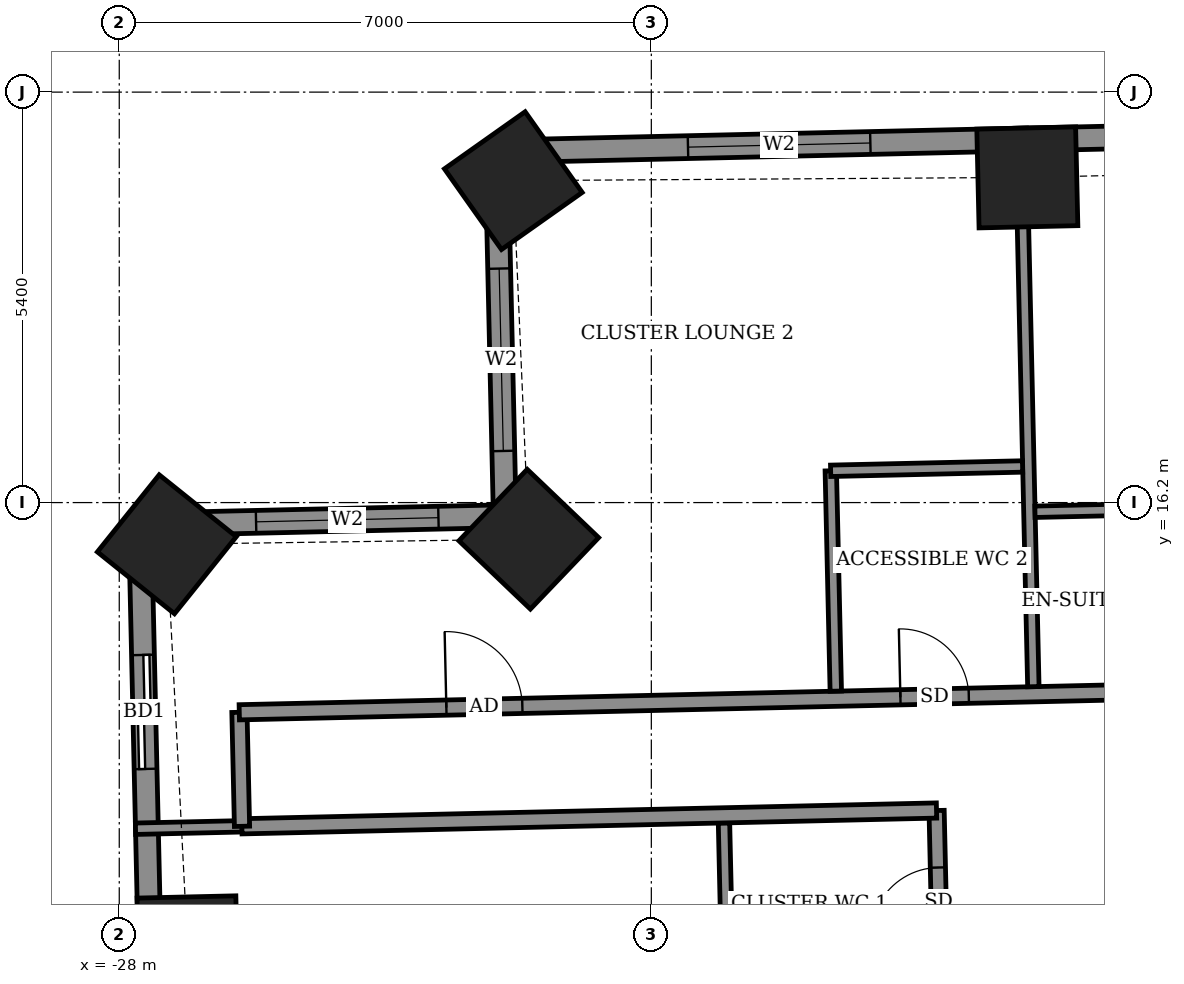
"""IFC4 building model, lengths in metres.
Left out: names, types, materials, properties, quantities, classifications, styles, units other than length and angle.
Written with IfcOpenShell. Run it as: python <this file> out.ifc"""

import sys

from ifc_helpers import new_model, si_unit, direction, frame, frame_2d, origin, origin_2d, place, context, subcontext, project, spatial, rectangle, extrude, element, fill, save


model = new_model("IFC4")
c1 = context("Model", 3, precision=1e-05, world=origin(), true_north=direction((0.0, 1.0)))
c2 = subcontext(c1, "Body", "Model", "MODEL_VIEW")
j1 = project(units=[si_unit("LENGTHUNIT", "METRE"), si_unit("PLANEANGLEUNIT", "RADIAN")], contexts=[c1])
p1 = place(None, origin())
s1 = spatial("IfcSite", under=j1, at=p1, CompositionType="ELEMENT")
p2 = place(p1, origin())
s2 = spatial("IfcBuilding", under=s1, at=p2, CompositionType="ELEMENT")
p3 = place(p2, frame((0.0, 0.0, 137.3)))
s3 = spatial("IfcBuildingStorey", under=s2, at=p3, CompositionType="ELEMENT", Elevation=137.3)
for number, where, z_axis, x_axis in (
    (1, (-16.053, 20.478, -0.55), (0.0, 0.0, 1.0), (-1.0, -0.023, 0.0)),
    (2, (-22.816, 20.435, -0.55), (0.0, 0.0, 1.0), (-0.816, -0.577, 0.0)),
    (3, (-22.612, 15.718, -0.55), (0.0, 0.0, 1.0), (-0.691, -0.723, 0.0)),
    (4, (-27.374, 15.651, -0.55), (0.0, 0.0, 1.0), (-0.626, -0.78, 0.0)),
    (5, (-27.101, 10.362, -0.55), (0.0, 0.0, 1.0), (0.023, -1.0, 0.0)),
):
    element("IfcColumn", number, at=place(p3, frame(where, z_axis=z_axis, x_axis=x_axis)), inside=s3, PredefinedType="COLUMN", context=c2, shape_type="SweptSolid", body=[
        extrude(rectangle(XDim=1.3, YDim=1.3, at=origin_2d()), origin(), (0.0, 0.0, 1.0), 3.6),
    ])
p4 = place(p3, frame((19.396, 21.782, 0.0), z_axis=(0.0, 0.0, 1.0), x_axis=(-0.999742636707, -0.022686126826, 0.0)))
e6 = element("IfcWall", 6, at=p4, inside=s3, PredefinedType="SOLIDWALL", context=c2, shape_type="SweptSolid", body=[
    extrude(rectangle(XDim=42.444, YDim=0.3, at=frame_2d((21.222, 0.0))), origin(), (0.0, 0.0, 1.0), 3.05),
])
p5 = place(p4, frame((1.982, 0.0, 0.0)))
e7 = element("IfcOpeningElement", 7, at=p5, cuts=e6, PredefinedType="OPENING", context=c2, shape_type="SweptSolid", body=[
    extrude(rectangle(XDim=1.5, YDim=2.4, at=frame_2d((0.75, 1.2))), frame((0.0, 0.16, 0.0), z_axis=(0.0, -1.0, 0.0), x_axis=(1.0, 0.0, 0.0)), (0.0, 0.0, 1.0), 0.32),
])
p6 = place(p4, frame((5.009, 0.0, 0.0)))
e8 = element("IfcOpeningElement", 8, at=p6, cuts=e6, PredefinedType="OPENING", context=c2, shape_type="SweptSolid", body=[
    extrude(rectangle(XDim=1.2, YDim=2.4, at=frame_2d((0.6, 1.2))), frame((0.0, 0.16, 0.0), z_axis=(0.0, -1.0, 0.0), x_axis=(1.0, 0.0, 0.0)), (0.0, 0.0, 1.0), 0.32),
])
p7 = place(p4, frame((10.394, 0.0, 0.0)))
e9 = element("IfcOpeningElement", 9, at=p7, cuts=e6, PredefinedType="OPENING", context=c2, shape_type="SweptSolid", body=[
    extrude(rectangle(XDim=1.5, YDim=2.4, at=frame_2d((0.75, 1.2))), frame((0.0, 0.16, 0.0), z_axis=(0.0, -1.0, 0.0), x_axis=(1.0, 0.0, 0.0)), (0.0, 0.0, 1.0), 0.32),
])
p8 = place(p4, frame((15.346, 0.0, 0.0)))
e10 = element("IfcOpeningElement", 10, at=p8, cuts=e6, PredefinedType="OPENING", context=c2, shape_type="SweptSolid", body=[
    extrude(rectangle(XDim=1.5, YDim=2.4, at=frame_2d((0.75, 1.2))), frame((0.0, 0.16, 0.0), z_axis=(0.0, -1.0, 0.0), x_axis=(1.0, 0.0, 0.0)), (0.0, 0.0, 1.0), 0.32),
])
p9 = place(p4, frame((18.508, 0.0, 0.0)))
e11 = element("IfcOpeningElement", 11, at=p9, cuts=e6, PredefinedType="OPENING", context=c2, shape_type="SweptSolid", body=[
    extrude(rectangle(XDim=1.5, YDim=2.4, at=frame_2d((0.75, 1.2))), frame((0.0, 0.16, 0.0), z_axis=(0.0, -1.0, 0.0), x_axis=(1.0, 0.0, 0.0)), (0.0, 0.0, 1.0), 0.32),
])
p10 = place(p4, frame((23.544, 0.0, 0.0)))
e12 = element("IfcOpeningElement", 12, at=p10, cuts=e6, PredefinedType="OPENING", context=c2, shape_type="SweptSolid", body=[
    extrude(rectangle(XDim=1.5, YDim=2.4, at=frame_2d((0.75, 1.2))), frame((0.0, 0.16, 0.0), z_axis=(0.0, -1.0, 0.0), x_axis=(1.0, 0.0, 0.0)), (0.0, 0.0, 1.0), 0.32),
])
p11 = place(p4, frame((29.195, 0.0, 0.0)))
e13 = element("IfcOpeningElement", 13, at=p11, cuts=e6, PredefinedType="OPENING", context=c2, shape_type="SweptSolid", body=[
    extrude(rectangle(XDim=1.5, YDim=2.4, at=frame_2d((0.75, 1.2))), frame((0.0, 0.16, 0.0), z_axis=(0.0, -1.0, 0.0), x_axis=(1.0, 0.0, 0.0)), (0.0, 0.0, 1.0), 0.32),
])
p12 = place(p4, frame((32.357, 0.0, 0.0)))
e14 = element("IfcOpeningElement", 14, at=p12, cuts=e6, PredefinedType="OPENING", context=c2, shape_type="SweptSolid", body=[
    extrude(rectangle(XDim=1.5, YDim=2.4, at=frame_2d((0.75, 1.2))), frame((0.0, 0.16, 0.0), z_axis=(0.0, -1.0, 0.0), x_axis=(1.0, 0.0, 0.0)), (0.0, 0.0, 1.0), 0.32),
])
p13 = place(p4, frame((37.524, 0.0, 0.9)))
e15 = element("IfcOpeningElement", 15, at=p13, cuts=e6, PredefinedType="OPENING", context=c2, shape_type="SweptSolid", body=[
    extrude(rectangle(XDim=2.4, YDim=1.5, at=frame_2d((1.2, 0.75))), frame((0.0, 0.16, 0.0), z_axis=(0.0, -1.0, 0.0), x_axis=(1.0, 0.0, 0.0)), (0.0, 0.0, 1.0), 0.32),
])
p14 = place(p3, frame((-23.037, 20.819, 0.0), z_axis=(0.0, 0.0, 1.0), x_axis=(0.022738738327, -0.999741441463, 0.0)))
e16 = element("IfcWall", 16, at=p14, inside=s3, PredefinedType="SOLIDWALL", context=c2, shape_type="SweptSolid", body=[
    extrude(rectangle(XDim=4.799, YDim=0.3, at=frame_2d((2.4, 0.0))), origin(), (0.0, 0.0, 1.0), 2.55),
])
p15 = place(p14, frame((1.541, 0.0, 0.9)))
e17 = element("IfcOpeningElement", 17, at=p15, cuts=e16, PredefinedType="OPENING", context=c2, shape_type="SweptSolid", body=[
    extrude(rectangle(XDim=2.4, YDim=1.5, at=frame_2d((1.2, 0.75))), frame((0.0, 0.16, 0.0), z_axis=(0.0, -1.0, 0.0), x_axis=(1.0, 0.0, 0.0)), (0.0, 0.0, 1.0), 0.32),
])
p16 = place(p3, frame((-22.928, 16.021, 0.0), z_axis=(0.0, 0.0, 1.0), x_axis=(-0.999742701292, -0.022683280499, 0.0)))
e18 = element("IfcWall", 18, at=p16, inside=s3, PredefinedType="SOLIDWALL", context=c2, shape_type="SweptSolid", body=[
    extrude(rectangle(XDim=4.8, YDim=0.3, at=frame_2d((2.4, 0.0))), origin(), (0.0, 0.0, 1.0), 2.55),
])
p17 = place(p16, frame((0.873, 0.0, 0.9)))
e19 = element("IfcOpeningElement", 19, at=p17, cuts=e18, PredefinedType="OPENING", context=c2, shape_type="SweptSolid", body=[
    extrude(rectangle(XDim=2.4, YDim=1.5, at=frame_2d((1.2, 0.75))), frame((0.0, 0.16, 0.0), z_axis=(0.0, -1.0, 0.0), x_axis=(1.0, 0.0, 0.0)), (0.0, 0.0, 1.0), 0.32),
])
p18 = place(p3, frame((-27.727, 15.912, 0.0), z_axis=(0.0, 0.0, 1.0), x_axis=(0.022690078929, -0.999742547018, 0.0)))
e20 = element("IfcWall", 20, at=p18, inside=s3, PredefinedType="SOLIDWALL", context=c2, shape_type="SweptSolid", body=[
    extrude(rectangle(XDim=11.33, YDim=0.3, at=frame_2d((5.665, 0.0))), origin(), (0.0, 0.0, 1.0), 3.05),
])
p19 = place(p18, frame((1.717, 0.0, 0.0)))
e21 = element("IfcOpeningElement", 21, at=p19, cuts=e20, PredefinedType="OPENING", context=c2, shape_type="SweptSolid", body=[
    extrude(rectangle(XDim=1.5, YDim=2.4, at=frame_2d((0.75, 1.2))), frame((0.0, 0.16, 0.0), z_axis=(0.0, -1.0, 0.0), x_axis=(1.0, 0.0, 0.0)), (0.0, 0.0, 1.0), 0.32),
])
p20 = place(p18, frame((6.544, 0.0, 0.9)))
e22 = element("IfcOpeningElement", 22, at=p20, cuts=e20, PredefinedType="OPENING", context=c2, shape_type="SweptSolid", body=[
    extrude(rectangle(XDim=1.2, YDim=1.5, at=frame_2d((0.6, 0.75))), frame((0.0, 0.16, 0.0), z_axis=(0.0, -1.0, 0.0), x_axis=(1.0, 0.0, 0.0)), (0.0, 0.0, 1.0), 0.32),
])
p21 = place(p18, frame((8.95, 0.0, 0.9)))
e23 = element("IfcOpeningElement", 23, at=p21, cuts=e20, PredefinedType="OPENING", context=c2, shape_type="SweptSolid", body=[
    extrude(rectangle(XDim=1.2, YDim=1.5, at=frame_2d((0.6, 0.75))), frame((0.0, 0.16, 0.0), z_axis=(0.0, -1.0, 0.0), x_axis=(1.0, 0.0, 0.0)), (0.0, 0.0, 1.0), 0.32),
])
p22 = place(p3, frame((-16.603, -16.218, 0.0), z_axis=(0.0, 0.0, 1.0), x_axis=(-0.022698146637, 0.999742363881, 0.0)))
e24 = element("IfcWall", 24, at=p22, inside=s3, PredefinedType="PARTITIONING", context=c2, shape_type="SweptSolid", body=[
    extrude(rectangle(XDim=28.374, YDim=0.2, at=frame_2d((14.187, 0.0))), origin(), (0.0, 0.0, 1.0), 3.05),
])
p23 = place(p22, frame((24.537, 0.0, 0.0)))
e25 = element("IfcOpeningElement", 25, at=p23, cuts=e24, PredefinedType="OPENING", context=c2, shape_type="SweptSolid", body=[
    extrude(rectangle(XDim=1.0, YDim=2.1, at=frame_2d((0.5, 1.05))), frame((0.0, 0.11, 0.0), z_axis=(0.0, -1.0, 0.0), x_axis=(1.0, 0.0, 0.0)), (0.0, 0.0, 1.0), 0.22),
])
p24 = place(p22, frame((26.724, 0.0, 0.0)))
e26 = element("IfcOpeningElement", 26, at=p24, cuts=e24, PredefinedType="OPENING", context=c2, shape_type="SweptSolid", body=[
    extrude(rectangle(XDim=0.9, YDim=2.1, at=frame_2d((0.45, 1.05))), frame((0.0, 0.11, 0.0), z_axis=(0.0, -1.0, 0.0), x_axis=(1.0, 0.0, 0.0)), (0.0, 0.0, 1.0), 0.22),
])
p25 = place(p22, frame((22.099, 0.0, 0.0)))
e27 = element("IfcOpeningElement", 27, at=p25, cuts=e24, PredefinedType="OPENING", context=c2, shape_type="SweptSolid", body=[
    extrude(rectangle(XDim=1.0, YDim=2.1, at=frame_2d((0.5, 1.05))), frame((0.0, 0.11, 0.0), z_axis=(0.0, -1.0, 0.0), x_axis=(1.0, 0.0, 0.0)), (0.0, 0.0, 1.0), 0.22),
])
p26 = place(p22, frame((16.324, 0.0, 0.0)))
e28 = element("IfcOpeningElement", 28, at=p26, cuts=e24, PredefinedType="OPENING", context=c2, shape_type="SweptSolid", body=[
    extrude(rectangle(XDim=1.0, YDim=2.1, at=frame_2d((0.5, 1.05))), frame((0.0, 0.11, 0.0), z_axis=(0.0, -1.0, 0.0), x_axis=(1.0, 0.0, 0.0)), (0.0, 0.0, 1.0), 0.22),
])
p27 = place(p22, frame((19.449, 0.0, 0.0)))
e29 = element("IfcOpeningElement", 29, at=p27, cuts=e24, PredefinedType="OPENING", context=c2, shape_type="SweptSolid", body=[
    extrude(rectangle(XDim=0.9, YDim=2.1, at=frame_2d((0.45, 1.05))), frame((0.0, 0.11, 0.0), z_axis=(0.0, -1.0, 0.0), x_axis=(1.0, 0.0, 0.0)), (0.0, 0.0, 1.0), 0.22),
])
p28 = place(p22, frame((13.574, 0.0, 0.0)))
e30 = element("IfcOpeningElement", 30, at=p28, cuts=e24, PredefinedType="OPENING", context=c2, shape_type="SweptSolid", body=[
    extrude(rectangle(XDim=1.0, YDim=2.1, at=frame_2d((0.5, 1.05))), frame((0.0, 0.11, 0.0), z_axis=(0.0, -1.0, 0.0), x_axis=(1.0, 0.0, 0.0)), (0.0, 0.0, 1.0), 0.22),
])
p29 = place(p22, frame((11.449, 0.0, 0.0)))
e31 = element("IfcOpeningElement", 31, at=p29, cuts=e24, PredefinedType="OPENING", context=c2, shape_type="SweptSolid", body=[
    extrude(rectangle(XDim=0.9, YDim=2.1, at=frame_2d((0.45, 1.05))), frame((0.0, 0.11, 0.0), z_axis=(0.0, -1.0, 0.0), x_axis=(1.0, 0.0, 0.0)), (0.0, 0.0, 1.0), 0.22),
])
p30 = place(p22, frame((8.524, 0.0, 0.0)))
e32 = element("IfcOpeningElement", 32, at=p30, cuts=e24, PredefinedType="OPENING", context=c2, shape_type="SweptSolid", body=[
    extrude(rectangle(XDim=1.0, YDim=2.1, at=frame_2d((0.5, 1.05))), frame((0.0, 0.11, 0.0), z_axis=(0.0, -1.0, 0.0), x_axis=(1.0, 0.0, 0.0)), (0.0, 0.0, 1.0), 0.22),
])
p31 = place(p22, frame((5.325, 0.0, 0.0)))
e33 = element("IfcOpeningElement", 33, at=p31, cuts=e24, PredefinedType="OPENING", context=c2, shape_type="SweptSolid", body=[
    extrude(rectangle(XDim=1.0, YDim=2.1, at=frame_2d((0.5, 1.05))), frame((0.0, 0.11, 0.0), z_axis=(0.0, -1.0, 0.0), x_axis=(1.0, 0.0, 0.0)), (0.0, 0.0, 1.0), 0.22),
])
p32 = place(p22, frame((2.85, 0.0, 0.0)))
e34 = element("IfcOpeningElement", 34, at=p32, cuts=e24, PredefinedType="OPENING", context=c2, shape_type="SweptSolid", body=[
    extrude(rectangle(XDim=1.0, YDim=2.1, at=frame_2d((0.5, 1.05))), frame((0.0, 0.11, 0.0), z_axis=(0.0, -1.0, 0.0), x_axis=(1.0, 0.0, 0.0)), (0.0, 0.0, 1.0), 0.22),
])
p33 = place(p22, frame((0.75, 0.0, 0.0)))
e35 = element("IfcOpeningElement", 35, at=p33, cuts=e24, PredefinedType="OPENING", context=c2, shape_type="SweptSolid", body=[
    extrude(rectangle(XDim=0.9, YDim=2.1, at=frame_2d((0.45, 1.05))), frame((0.0, 0.11, 0.0), z_axis=(0.0, -1.0, 0.0), x_axis=(1.0, 0.0, 0.0)), (0.0, 0.0, 1.0), 0.22),
])
p34 = place(p3, frame((-19.992, 9.686, 0.0), z_axis=(0.0, 0.0, 1.0), x_axis=(-0.022612884682, 0.999744296031, 0.0)))
e36 = element("IfcWall", 36, at=p34, inside=s3, PredefinedType="PARTITIONING", context=c2, shape_type="SweptSolid", body=[
    extrude(rectangle(XDim=2.3, YDim=0.15, at=frame_2d((1.15, 0.0))), origin(), (0.0, 0.0, 1.0), 3.05),
])
p35 = place(p3, frame((-27.786, 11.909, 0.0), z_axis=(0.0, 0.0, 1.0), x_axis=(0.999740216184, 0.022792545827, 0.0)))
e37 = element("IfcWall", 37, at=p35, inside=s3, PredefinedType="PARTITIONING", context=c2, shape_type="SweptSolid", body=[
    extrude(rectangle(XDim=1.403, YDim=0.15, at=frame_2d((0.702, 0.0))), origin(), (0.0, 0.0, 1.0), 2.55),
])
p36 = place(p3, frame((-26.387, 11.941, 0.0), z_axis=(0.0, 0.0, 1.0), x_axis=(0.999741076645, 0.022754772455, 0.0)))
e38 = element("IfcWall", 38, at=p36, inside=s3, PredefinedType="PARTITIONING", context=c2, shape_type="SweptSolid", body=[
    extrude(rectangle(XDim=9.141, YDim=0.2, at=frame_2d((4.571, 0.0))), origin(), (0.0, 0.0, 1.0), 3.05),
])
p37 = place(p3, frame((-26.385, 11.941, 0.0), z_axis=(0.0, 0.0, 1.0), x_axis=(-0.022617910375, 0.999744182344, 0.0)))
e39 = element("IfcWall", 39, at=p37, inside=s3, PredefinedType="PARTITIONING", context=c2, shape_type="SweptSolid", body=[
    extrude(rectangle(XDim=1.5, YDim=0.2, at=frame_2d((0.75, 0.0))), origin(), (0.0, 0.0, 1.0), 3.05),
])
p38 = place(p3, frame((-26.421, 13.441, 0.0), z_axis=(0.0, 0.0, 1.0), x_axis=(0.999742754064, 0.022680954485, 0.0)))
e40 = element("IfcWall", 40, at=p38, inside=s3, PredefinedType="PARTITIONING", context=c2, shape_type="SweptSolid", body=[
    extrude(rectangle(XDim=48.945, YDim=0.2, at=frame_2d((24.472, 0.0))), origin(), (0.0, 0.0, 1.0), 3.05),
])
p39 = place(p38, frame((46.647, 0.0, 0.0)))
e41 = element("IfcOpeningElement", 41, at=p39, cuts=e40, PredefinedType="OPENING", context=c2, shape_type="SweptSolid", body=[
    extrude(rectangle(XDim=1.0, YDim=2.1, at=frame_2d((0.5, 1.05))), frame((0.0, 0.11, 0.0), z_axis=(0.0, -1.0, 0.0), x_axis=(1.0, 0.0, 0.0)), (0.0, 0.0, 1.0), 0.22),
])
p40 = place(p38, frame((42.2, 0.0, 0.0)))
e42 = element("IfcOpeningElement", 42, at=p40, cuts=e40, PredefinedType="OPENING", context=c2, shape_type="SweptSolid", body=[
    extrude(rectangle(XDim=0.9, YDim=2.1, at=frame_2d((0.45, 1.05))), frame((0.0, 0.11, 0.0), z_axis=(0.0, -1.0, 0.0), x_axis=(1.0, 0.0, 0.0)), (0.0, 0.0, 1.0), 0.22),
])
p41 = place(p38, frame((39.925, 0.0, 0.0)))
e43 = element("IfcOpeningElement", 43, at=p41, cuts=e40, PredefinedType="OPENING", context=c2, shape_type="SweptSolid", body=[
    extrude(rectangle(XDim=0.9, YDim=2.1, at=frame_2d((0.45, 1.05))), frame((0.0, 0.11, 0.0), z_axis=(0.0, -1.0, 0.0), x_axis=(1.0, 0.0, 0.0)), (0.0, 0.0, 1.0), 0.22),
])
p42 = place(p38, frame((33.2, 0.0, 0.0)))
e44 = element("IfcOpeningElement", 44, at=p42, cuts=e40, PredefinedType="OPENING", context=c2, shape_type="SweptSolid", body=[
    extrude(rectangle(XDim=0.9, YDim=2.1, at=frame_2d((0.45, 1.05))), frame((0.0, 0.11, 0.0), z_axis=(0.0, -1.0, 0.0), x_axis=(1.0, 0.0, 0.0)), (0.0, 0.0, 1.0), 0.22),
])
p43 = place(p38, frame((31.25, 0.0, 0.0)))
e45 = element("IfcOpeningElement", 45, at=p43, cuts=e40, PredefinedType="OPENING", context=c2, shape_type="SweptSolid", body=[
    extrude(rectangle(XDim=0.9, YDim=2.1, at=frame_2d((0.45, 1.05))), frame((0.0, 0.11, 0.0), z_axis=(0.0, -1.0, 0.0), x_axis=(1.0, 0.0, 0.0)), (0.0, 0.0, 1.0), 0.22),
])
p44 = place(p38, frame((24.5, 0.0, 0.0)))
e46 = element("IfcOpeningElement", 46, at=p44, cuts=e40, PredefinedType="OPENING", context=c2, shape_type="SweptSolid", body=[
    extrude(rectangle(XDim=0.9, YDim=2.1, at=frame_2d((0.45, 1.05))), frame((0.0, 0.11, 0.0), z_axis=(0.0, -1.0, 0.0), x_axis=(1.0, 0.0, 0.0)), (0.0, 0.0, 1.0), 0.22),
])
p45 = place(p38, frame((22.45, 0.0, 0.0)))
e47 = element("IfcOpeningElement", 47, at=p45, cuts=e40, PredefinedType="OPENING", context=c2, shape_type="SweptSolid", body=[
    extrude(rectangle(XDim=0.9, YDim=2.1, at=frame_2d((0.45, 1.05))), frame((0.0, 0.11, 0.0), z_axis=(0.0, -1.0, 0.0), x_axis=(1.0, 0.0, 0.0)), (0.0, 0.0, 1.0), 0.22),
])
p46 = place(p38, frame((15.475, 0.0, 0.0)))
e48 = element("IfcOpeningElement", 48, at=p46, cuts=e40, PredefinedType="OPENING", context=c2, shape_type="SweptSolid", body=[
    extrude(rectangle(XDim=0.9, YDim=2.1, at=frame_2d((0.45, 1.05))), frame((0.0, 0.11, 0.0), z_axis=(0.0, -1.0, 0.0), x_axis=(1.0, 0.0, 0.0)), (0.0, 0.0, 1.0), 0.22),
])
p47 = place(p38, frame((13.4, 0.0, 0.0)))
e49 = element("IfcOpeningElement", 49, at=p47, cuts=e40, PredefinedType="OPENING", context=c2, shape_type="SweptSolid", body=[
    extrude(rectangle(XDim=0.9, YDim=2.1, at=frame_2d((0.45, 1.05))), frame((0.0, 0.11, 0.0), z_axis=(0.0, -1.0, 0.0), x_axis=(1.0, 0.0, 0.0)), (0.0, 0.0, 1.0), 0.22),
])
p48 = place(p38, frame((2.725, 0.0, 0.0)))
e50 = element("IfcOpeningElement", 50, at=p48, cuts=e40, PredefinedType="OPENING", context=c2, shape_type="SweptSolid", body=[
    extrude(rectangle(XDim=1.0, YDim=2.1, at=frame_2d((0.5, 1.05))), frame((0.0, 0.11, 0.0), z_axis=(0.0, -1.0, 0.0), x_axis=(1.0, 0.0, 0.0)), (0.0, 0.0, 1.0), 0.22),
])
p49 = place(p38, frame((8.7, 0.0, 0.0)))
e51 = element("IfcOpeningElement", 51, at=p49, cuts=e40, PredefinedType="OPENING", context=c2, shape_type="SweptSolid", body=[
    extrude(rectangle(XDim=0.9, YDim=2.1, at=frame_2d((0.45, 1.05))), frame((0.0, 0.11, 0.0), z_axis=(0.0, -1.0, 0.0), x_axis=(1.0, 0.0, 0.0)), (0.0, 0.0, 1.0), 0.22),
])
p50 = place(p3, frame((-18.573, 13.719, 0.0), z_axis=(0.0, 0.0, 1.0), x_axis=(-0.022732880677, 0.999741574676, 0.0)))
e52 = element("IfcWall", 52, at=p50, inside=s3, PredefinedType="PARTITIONING", context=c2, shape_type="SweptSolid", body=[
    extrude(rectangle(XDim=2.9, YDim=0.15, at=frame_2d((1.45, 0.0))), origin(), (0.0, 0.0, 1.0), 3.05),
])
p51 = place(p3, frame((-15.974, 13.778, 0.0), z_axis=(0.0, 0.0, 1.0), x_axis=(-0.022554648976, 0.999745611548, 0.0)))
e53 = element("IfcWall", 53, at=p51, inside=s3, PredefinedType="PARTITIONING", context=c2, shape_type="SweptSolid", body=[
    extrude(rectangle(XDim=7.35, YDim=0.15, at=frame_2d((3.675, 0.0))), origin(), (0.0, 0.0, 1.0), 3.05),
])
p52 = place(p3, frame((-15.953, 16.079, 0.0), z_axis=(0.0, 0.0, 1.0), x_axis=(0.999740260747, 0.02279059109, 0.0)))
e54 = element("IfcWall", 54, at=p52, inside=s3, PredefinedType="PARTITIONING", context=c2, shape_type="SweptSolid", body=[
    extrude(rectangle(XDim=2.324, YDim=0.15, at=frame_2d((1.162, 0.0))), origin(), (0.0, 0.0, 1.0), 3.05),
])
p53 = place(p3, frame((-18.641, 16.618, 0.0), z_axis=(0.0, 0.0, 1.0), x_axis=(0.999744175585, 0.022618209135, 0.0)))
e55 = element("IfcWall", 55, at=p53, inside=s3, PredefinedType="PARTITIONING", context=c2, shape_type="SweptSolid", body=[
    extrude(rectangle(XDim=2.526, YDim=0.15, at=frame_2d((1.263, 0.0))), origin(), (0.0, 0.0, 1.0), 3.05),
])
p54 = place(p13, origin())
e56 = element("IfcWindow", 56, at=p54, inside=s3, PartitioningType="DOUBLE_PANEL_VERTICAL", PredefinedType="WINDOW", context=c2, shape_type="SweptSolid", body=[
    extrude(rectangle(XDim=2.4, YDim=1.5, at=frame_2d((1.2, 0.75))), frame((0.0, 0.03, 0.0), z_axis=(0.0, -1.0, 0.0), x_axis=(1.0, 0.0, 0.0)), (0.0, 0.0, 1.0), 0.06),
])
fill(e15, e56)
p55 = place(p15, origin())
e57 = element("IfcWindow", 57, at=p55, inside=s3, PartitioningType="DOUBLE_PANEL_VERTICAL", PredefinedType="WINDOW", context=c2, shape_type="SweptSolid", body=[
    extrude(rectangle(XDim=2.4, YDim=1.5, at=frame_2d((1.2, 0.75))), frame((0.0, 0.03, 0.0), z_axis=(0.0, -1.0, 0.0), x_axis=(1.0, 0.0, 0.0)), (0.0, 0.0, 1.0), 0.06),
])
fill(e17, e57)
p56 = place(p17, origin())
e58 = element("IfcWindow", 58, at=p56, inside=s3, PartitioningType="DOUBLE_PANEL_VERTICAL", PredefinedType="WINDOW", context=c2, shape_type="SweptSolid", body=[
    extrude(rectangle(XDim=2.4, YDim=1.5, at=frame_2d((1.2, 0.75))), frame((0.0, 0.03, 0.0), z_axis=(0.0, -1.0, 0.0), x_axis=(1.0, 0.0, 0.0)), (0.0, 0.0, 1.0), 0.06),
])
fill(e19, e58)
p57 = place(p19, origin())
e59 = element("IfcDoor", 59, at=p57, inside=s3, OperationType="SLIDING_TO_LEFT", PredefinedType="DOOR", context=c2, shape_type="SweptSolid", body=[
    extrude(rectangle(XDim=1.5, YDim=2.4, at=frame_2d((0.75, 1.2))), frame((0.0, 0.025, 0.0), z_axis=(0.0, -1.0, 0.0), x_axis=(1.0, 0.0, 0.0)), (0.0, 0.0, 1.0), 0.05),
])
fill(e21, e59)
p58 = place(p48, origin())
e60 = element("IfcDoor", 60, at=p58, inside=s3, OperationType="SINGLE_SWING_LEFT", PredefinedType="DOOR", context=c2, shape_type="SweptSolid", body=[
    extrude(rectangle(XDim=1.0, YDim=2.1, at=frame_2d((0.5, 1.05))), frame((0.0, 0.025, 0.0), z_axis=(0.0, -1.0, 0.0), x_axis=(1.0, 0.0, 0.0)), (0.0, 0.0, 1.0), 0.05),
])
fill(e50, e60)
p59 = place(p49, origin())
e61 = element("IfcDoor", 61, at=p59, inside=s3, OperationType="SINGLE_SWING_RIGHT", PredefinedType="DOOR", context=c2, shape_type="SweptSolid", body=[
    extrude(rectangle(XDim=0.9, YDim=2.1, at=frame_2d((0.45, 1.05))), frame((0.0, 0.025, 0.0), z_axis=(0.0, -1.0, 0.0), x_axis=(1.0, 0.0, 0.0)), (0.0, 0.0, 1.0), 0.05),
])
fill(e51, e61)
p60 = place(p24, origin())
e62 = element("IfcDoor", 62, at=p60, inside=s3, OperationType="SINGLE_SWING_LEFT", PredefinedType="DOOR", context=c2, shape_type="SweptSolid", body=[
    extrude(rectangle(XDim=0.9, YDim=2.1, at=frame_2d((0.45, 1.05))), frame((0.0, 0.025, 0.0), z_axis=(0.0, -1.0, 0.0), x_axis=(1.0, 0.0, 0.0)), (0.0, 0.0, 1.0), 0.05),
])
fill(e26, e62)
save(model, sys.argv[1])
